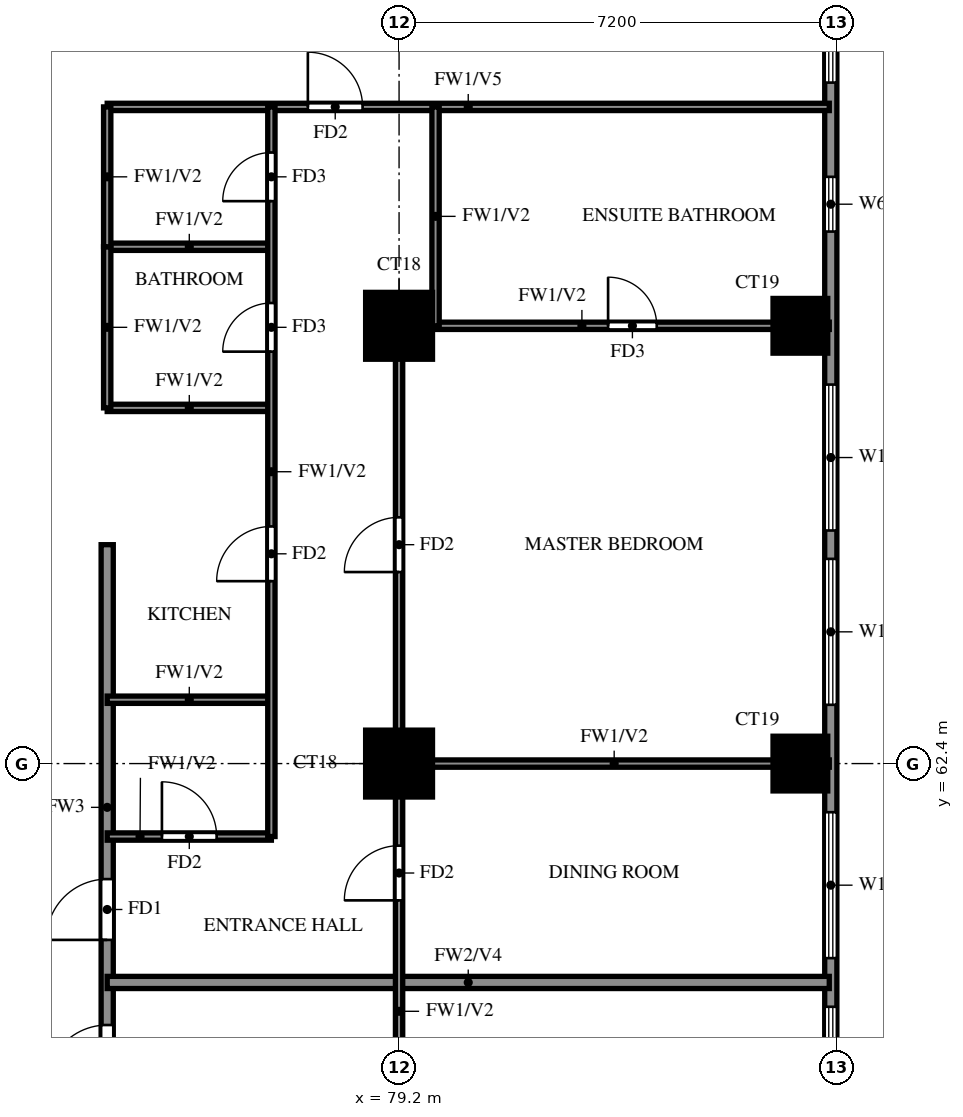
"""IFC4 building model, lengths in metres.
Left out: names, types, materials, properties, quantities, classifications, styles, units other than length and angle.
Written with IfcOpenShell. Run it as: python <this file> out.ifc"""

import sys

from ifc_helpers import new_model, si_unit, direction, frame, frame_2d, origin, origin_2d, place, context, subcontext, project, spatial, rectangle, extrude, source, transform, mapped, element, fill, save


model = new_model("IFC4")
c1 = context("Model", 3, precision=1e-05, world=origin(), true_north=direction((0.0, 1.0)))
c2 = subcontext(c1, "Body", "Model", "MODEL_VIEW")
j1 = project(units=[si_unit("LENGTHUNIT", "METRE"), si_unit("PLANEANGLEUNIT", "RADIAN")], contexts=[c1])
p1 = place(None, origin())
s1 = spatial("IfcSite", under=j1, at=p1, CompositionType="ELEMENT")
p2 = place(p1, origin())
s2 = spatial("IfcBuilding", under=s1, at=p2, CompositionType="ELEMENT")
p3 = place(p2, frame((0.0, 0.0, 116.5)))
s3 = spatial("IfcBuildingStorey", under=s2, at=p3, CompositionType="ELEMENT", Elevation=116.5)
m1 = source(origin(), c2, "Body", "SweptSolid", [
    extrude(rectangle(XDim=1.1, YDim=1.1, at=origin_2d()), origin(), (0.0, 0.0, 1.0), 3.2),
])
p4 = place(p3, frame((79.2, 62.4, 0.0), z_axis=(0.0, 0.0, 1.0), x_axis=(1.0, 0.0, 0.0)))
e1 = element("IfcColumn", 1, at=p4, inside=s3, PredefinedType="COLUMN", context=c2, shape_type="MappedRepresentation", body=[
    mapped(m1, transform((0.0, 0.0, 0.0))),
])
m2 = source(origin(), c2, "Body", "SweptSolid", [
    extrude(rectangle(XDim=0.9, YDim=0.9, at=origin_2d()), origin(), (0.0, 0.0, 1.0), 3.2),
])
p5 = place(p3, frame((85.8, 62.4, 0.0), z_axis=(0.0, 0.0, 1.0), x_axis=(1.0, 0.0, 0.0)))
e2 = element("IfcColumn", 2, at=p5, inside=s3, PredefinedType="COLUMN", context=c2, shape_type="MappedRepresentation", body=[
    mapped(m2, transform((0.0, 0.0, 0.0))),
])
p6 = place(p3, frame((79.2, 69.6, 0.0), z_axis=(0.0, 0.0, 1.0), x_axis=(1.0, 0.0, 0.0)))
e3 = element("IfcColumn", 3, at=p6, inside=s3, PredefinedType="COLUMN", context=c2, shape_type="MappedRepresentation", body=[
    mapped(m1, transform((0.0, 0.0, 0.0))),
])
p7 = place(p3, frame((85.8, 69.6, 0.0), z_axis=(0.0, 0.0, 1.0), x_axis=(1.0, 0.0, 0.0)))
e4 = element("IfcColumn", 4, at=p7, inside=s3, PredefinedType="COLUMN", context=c2, shape_type="MappedRepresentation", body=[
    mapped(m2, transform((0.0, 0.0, 0.0))),
])
p8 = place(p3, frame((86.3, 48.2, 0.0), z_axis=(0.0, 0.0, 1.0), x_axis=(0.0, 1.0, 0.0)))
e5 = element("IfcWall", 5, at=p8, inside=s3, PredefinedType="SOLIDWALL", context=c2, shape_type="SweptSolid", body=[
    extrude(rectangle(XDim=28.6, YDim=0.2, at=frame_2d((14.3, 0.0))), origin(), (0.0, 0.0, 1.0), 3.2),
])
p9 = place(p8, frame((0.6, 0.0, 0.6)))
e6 = element("IfcOpeningElement", 6, at=p9, cuts=e5, PredefinedType="OPENING", context=c2, shape_type="SweptSolid", body=[
    extrude(rectangle(XDim=2.4, YDim=2.4, at=frame_2d((1.2, 1.2))), frame((0.0, 0.11, 0.0), z_axis=(0.0, -1.0, 0.0), x_axis=(1.0, 0.0, 0.0)), (0.0, 0.0, 1.0), 0.22),
])
p10 = place(p8, frame((3.8, 0.0, 0.6)))
e7 = element("IfcOpeningElement", 7, at=p10, cuts=e5, PredefinedType="OPENING", context=c2, shape_type="SweptSolid", body=[
    extrude(rectangle(XDim=2.4, YDim=2.4, at=frame_2d((1.2, 1.2))), frame((0.0, 0.11, 0.0), z_axis=(0.0, -1.0, 0.0), x_axis=(1.0, 0.0, 0.0)), (0.0, 0.0, 1.0), 0.22),
])
p11 = place(p8, frame((7.8, 0.0, 0.6)))
e8 = element("IfcOpeningElement", 8, at=p11, cuts=e5, PredefinedType="OPENING", context=c2, shape_type="SweptSolid", body=[
    extrude(rectangle(XDim=2.4, YDim=2.4, at=frame_2d((1.2, 1.2))), frame((0.0, 0.11, 0.0), z_axis=(0.0, -1.0, 0.0), x_axis=(1.0, 0.0, 0.0)), (0.0, 0.0, 1.0), 0.22),
])
p12 = place(p8, frame((11.0, 0.0, 0.6)))
e9 = element("IfcOpeningElement", 9, at=p12, cuts=e5, PredefinedType="OPENING", context=c2, shape_type="SweptSolid", body=[
    extrude(rectangle(XDim=2.4, YDim=2.4, at=frame_2d((1.2, 1.2))), frame((0.0, 0.11, 0.0), z_axis=(0.0, -1.0, 0.0), x_axis=(1.0, 0.0, 0.0)), (0.0, 0.0, 1.0), 0.22),
])
p13 = place(p8, frame((15.167, 0.0, 0.6)))
e10 = element("IfcOpeningElement", 10, at=p13, cuts=e5, PredefinedType="OPENING", context=c2, shape_type="SweptSolid", body=[
    extrude(rectangle(XDim=2.4, YDim=2.4, at=frame_2d((1.2, 1.2))), frame((0.0, 0.11, 0.0), z_axis=(0.0, -1.0, 0.0), x_axis=(1.0, 0.0, 0.0)), (0.0, 0.0, 1.0), 0.22),
])
p14 = place(p8, frame((18.033, 0.0, 0.6)))
e11 = element("IfcOpeningElement", 11, at=p14, cuts=e5, PredefinedType="OPENING", context=c2, shape_type="SweptSolid", body=[
    extrude(rectangle(XDim=2.4, YDim=2.4, at=frame_2d((1.2, 1.2))), frame((0.0, 0.11, 0.0), z_axis=(0.0, -1.0, 0.0), x_axis=(1.0, 0.0, 0.0)), (0.0, 0.0, 1.0), 0.22),
])
p15 = place(p8, frame((22.95, 0.0, 1.5)))
e12 = element("IfcOpeningElement", 12, at=p15, cuts=e5, PredefinedType="OPENING", context=c2, shape_type="SweptSolid", body=[
    extrude(rectangle(XDim=0.9, YDim=0.9, at=frame_2d((0.45, 0.45))), frame((0.0, 0.11, 0.0), z_axis=(0.0, -1.0, 0.0), x_axis=(1.0, 0.0, 0.0)), (0.0, 0.0, 1.0), 0.22),
])
p16 = place(p8, frame((25.4, 0.0, 0.6)))
e13 = element("IfcOpeningElement", 13, at=p16, cuts=e5, PredefinedType="OPENING", context=c2, shape_type="SweptSolid", body=[
    extrude(rectangle(XDim=2.4, YDim=2.4, at=frame_2d((1.2, 1.2))), frame((0.0, 0.11, 0.0), z_axis=(0.0, -1.0, 0.0), x_axis=(1.0, 0.0, 0.0)), (0.0, 0.0, 1.0), 0.22),
])
p17 = place(p3, frame((74.4, 56.4, 0.0), z_axis=(0.0, 0.0, 1.0), x_axis=(0.0, 1.0, 0.0)))
e14 = element("IfcWall", 14, at=p17, inside=s3, PredefinedType="SOLIDWALL", context=c2, shape_type="SweptSolid", body=[
    extrude(rectangle(XDim=9.6, YDim=0.2, at=frame_2d((4.8, 0.0))), origin(), (0.0, 0.0, 1.0), 3.2),
])
p18 = place(p17, frame((0.7, 0.0, 0.0)))
e15 = element("IfcOpeningElement", 15, at=p18, cuts=e14, PredefinedType="OPENING", context=c2, shape_type="SweptSolid", body=[
    extrude(rectangle(XDim=1.0, YDim=2.1, at=frame_2d((0.5, 1.05))), frame((0.0, 0.11, 0.0), z_axis=(0.0, -1.0, 0.0), x_axis=(1.0, 0.0, 0.0)), (0.0, 0.0, 1.0), 0.22),
])
p19 = place(p17, frame((3.1, 0.0, 0.0)))
e16 = element("IfcOpeningElement", 16, at=p19, cuts=e14, PredefinedType="OPENING", context=c2, shape_type="SweptSolid", body=[
    extrude(rectangle(XDim=1.0, YDim=2.1, at=frame_2d((0.5, 1.05))), frame((0.0, 0.11, 0.0), z_axis=(0.0, -1.0, 0.0), x_axis=(1.0, 0.0, 0.0)), (0.0, 0.0, 1.0), 0.22),
])
p20 = place(p3, frame((74.4, 58.8, 0.0), z_axis=(0.0, 0.0, 1.0), x_axis=(1.0, 0.0, 0.0)))
e17 = element("IfcWall", 17, at=p20, inside=s3, PredefinedType="SOLIDWALL", context=c2, shape_type="SweptSolid", body=[
    extrude(rectangle(XDim=11.875, YDim=0.2, at=frame_2d((5.938, 0.0))), origin(), (0.0, 0.0, 1.0), 2.3),
])
p21 = place(p3, frame((74.4, 61.2, 0.0), z_axis=(0.0, 0.0, 1.0), x_axis=(1.0, 0.0, 0.0)))
e18 = element("IfcWall", 18, at=p21, inside=s3, PredefinedType="PARTITIONING", context=c2, shape_type="SweptSolid", body=[
    extrude(rectangle(XDim=2.7, YDim=0.12, at=frame_2d((1.35, 0.0))), origin(), (0.0, 0.0, 1.0), 3.2),
])
p22 = place(p21, frame((0.9, 0.0, 0.0)))
e19 = element("IfcOpeningElement", 19, at=p22, cuts=e18, PredefinedType="OPENING", context=c2, shape_type="SweptSolid", body=[
    extrude(rectangle(XDim=0.9, YDim=2.1, at=frame_2d((0.45, 1.05))), frame((0.0, 0.07, 0.0), z_axis=(0.0, -1.0, 0.0), x_axis=(1.0, 0.0, 0.0)), (0.0, 0.0, 1.0), 0.14),
])
p23 = place(p3, frame((79.2, 62.4, 0.0), z_axis=(0.0, 0.0, 1.0), x_axis=(1.0, 0.0, 0.0)))
e20 = element("IfcWall", 20, at=p23, inside=s3, PredefinedType="PARTITIONING", context=c2, shape_type="SweptSolid", body=[
    extrude(rectangle(XDim=7.075, YDim=0.12, at=frame_2d((3.538, 0.0))), origin(), (0.0, 0.0, 1.0), 3.2),
])
for number, where, z_axis, x_axis in (
    (21, (74.4, 63.45, 0.0), (0.0, 0.0, 1.0), (1.0, 0.0, 0.0)),
    (22, (74.4, 68.25, 0.0), (0.0, 0.0, 1.0), (1.0, 0.0, 0.0)),
):
    element("IfcWall", number, at=place(p3, frame(where, z_axis=z_axis, x_axis=x_axis)), inside=s3, PredefinedType="PARTITIONING", context=c2, shape_type="SweptSolid", body=[
        extrude(rectangle(XDim=2.7, YDim=0.12, at=frame_2d((1.35, 0.0))), origin(), (0.0, 0.0, 1.0), 3.2),
    ])
p24 = place(p3, frame((79.2, 69.6, 0.0), z_axis=(0.0, 0.0, 1.0), x_axis=(1.0, 0.0, 0.0)))
e23 = element("IfcWall", 23, at=p24, inside=s3, PredefinedType="PARTITIONING", context=c2, shape_type="SweptSolid", body=[
    extrude(rectangle(XDim=7.075, YDim=0.12, at=frame_2d((3.538, 0.0))), origin(), (0.0, 0.0, 1.0), 3.2),
])
p25 = place(p24, frame((3.438, 0.0, 0.0)))
e24 = element("IfcOpeningElement", 24, at=p25, cuts=e23, PredefinedType="OPENING", context=c2, shape_type="SweptSolid", body=[
    extrude(rectangle(XDim=0.8, YDim=2.1, at=frame_2d((0.4, 1.05))), frame((0.0, 0.07, 0.0), z_axis=(0.0, -1.0, 0.0), x_axis=(1.0, 0.0, 0.0)), (0.0, 0.0, 1.0), 0.14),
])
p26 = place(p3, frame((74.4, 70.9, 0.0), z_axis=(0.0, 0.0, 1.0), x_axis=(1.0, 0.0, 0.0)))
e25 = element("IfcWall", 25, at=p26, inside=s3, PredefinedType="PARTITIONING", context=c2, shape_type="SweptSolid", body=[
    extrude(rectangle(XDim=2.7, YDim=0.12, at=frame_2d((1.35, 0.0))), origin(), (0.0, 0.0, 1.0), 3.2),
])
p27 = place(p3, frame((74.4, 73.2, 0.0), z_axis=(0.0, 0.0, 1.0), x_axis=(1.0, 0.0, 0.0)))
e26 = element("IfcWall", 26, at=p27, inside=s3, PredefinedType="PARTITIONING", context=c2, shape_type="SweptSolid", body=[
    extrude(rectangle(XDim=11.875, YDim=0.12, at=frame_2d((5.938, 0.0))), origin(), (0.0, 0.0, 1.0), 2.3),
])
p28 = place(p27, frame((3.3, 0.0, 0.0)))
e27 = element("IfcOpeningElement", 27, at=p28, cuts=e26, PredefinedType="OPENING", context=c2, shape_type="SweptSolid", body=[
    extrude(rectangle(XDim=0.9, YDim=2.1, at=frame_2d((0.45, 1.05))), frame((0.0, 0.07, 0.0), z_axis=(0.0, -1.0, 0.0), x_axis=(1.0, 0.0, 0.0)), (0.0, 0.0, 1.0), 0.14),
])
p29 = place(p3, frame((74.4, 68.25, 0.0), z_axis=(0.0, 0.0, 1.0), x_axis=(0.0, 1.0, 0.0)))
e28 = element("IfcWall", 28, at=p29, inside=s3, PredefinedType="PARTITIONING", context=c2, shape_type="SweptSolid", body=[
    extrude(rectangle(XDim=2.65, YDim=0.12, at=frame_2d((1.325, 0.0))), origin(), (0.0, 0.0, 1.0), 3.2),
])
p30 = place(p3, frame((74.4, 70.9, 0.0), z_axis=(0.0, 0.0, 1.0), x_axis=(0.0, 1.0, 0.0)))
e29 = element("IfcWall", 29, at=p30, inside=s3, PredefinedType="PARTITIONING", context=c2, shape_type="SweptSolid", body=[
    extrude(rectangle(XDim=2.3, YDim=0.12, at=frame_2d((1.15, 0.0))), origin(), (0.0, 0.0, 1.0), 3.2),
])
p31 = place(p3, frame((77.1, 61.2, 0.0), z_axis=(0.0, 0.0, 1.0), x_axis=(0.0, 1.0, 0.0)))
e30 = element("IfcWall", 30, at=p31, inside=s3, PredefinedType="PARTITIONING", context=c2, shape_type="SweptSolid", body=[
    extrude(rectangle(XDim=12.0, YDim=0.12, at=frame_2d((6.0, 0.0))), origin(), (0.0, 0.0, 1.0), 3.2),
])
p32 = place(p31, frame((4.2, 0.0, 0.0)))
e31 = element("IfcOpeningElement", 31, at=p32, cuts=e30, PredefinedType="OPENING", context=c2, shape_type="SweptSolid", body=[
    extrude(rectangle(XDim=0.9, YDim=2.1, at=frame_2d((0.45, 1.05))), frame((0.0, 0.07, 0.0), z_axis=(0.0, -1.0, 0.0), x_axis=(1.0, 0.0, 0.0)), (0.0, 0.0, 1.0), 0.14),
])
p33 = place(p31, frame((7.975, 0.0, 0.0)))
e32 = element("IfcOpeningElement", 32, at=p33, cuts=e30, PredefinedType="OPENING", context=c2, shape_type="SweptSolid", body=[
    extrude(rectangle(XDim=0.8, YDim=2.1, at=frame_2d((0.4, 1.05))), frame((0.0, 0.07, 0.0), z_axis=(0.0, -1.0, 0.0), x_axis=(1.0, 0.0, 0.0)), (0.0, 0.0, 1.0), 0.14),
])
p34 = place(p31, frame((10.45, 0.0, 0.0)))
e33 = element("IfcOpeningElement", 33, at=p34, cuts=e30, PredefinedType="OPENING", context=c2, shape_type="SweptSolid", body=[
    extrude(rectangle(XDim=0.8, YDim=2.1, at=frame_2d((0.4, 1.05))), frame((0.0, 0.07, 0.0), z_axis=(0.0, -1.0, 0.0), x_axis=(1.0, 0.0, 0.0)), (0.0, 0.0, 1.0), 0.14),
])
p35 = place(p3, frame((79.2, 48.125, 0.0), z_axis=(0.0, 0.0, 1.0), x_axis=(0.0, 1.0, 0.0)))
e34 = element("IfcWall", 34, at=p35, inside=s3, PredefinedType="PARTITIONING", context=c2, shape_type="SweptSolid", body=[
    extrude(rectangle(XDim=21.475, YDim=0.12, at=frame_2d((10.738, 0.0))), origin(), (0.0, 0.0, 1.0), 3.2),
])
p36 = place(p35, frame((1.288, 0.0, 0.0)))
e35 = element("IfcOpeningElement", 35, at=p36, cuts=e34, PredefinedType="OPENING", context=c2, shape_type="SweptSolid", body=[
    extrude(rectangle(XDim=0.9, YDim=2.1, at=frame_2d((0.45, 1.05))), frame((0.0, 0.07, 0.0), z_axis=(0.0, -1.0, 0.0), x_axis=(1.0, 0.0, 0.0)), (0.0, 0.0, 1.0), 0.14),
])
p37 = place(p35, frame((7.825, 0.0, 0.0)))
e36 = element("IfcOpeningElement", 36, at=p37, cuts=e34, PredefinedType="OPENING", context=c2, shape_type="SweptSolid", body=[
    extrude(rectangle(XDim=1.5, YDim=2.1, at=frame_2d((0.75, 1.05))), frame((0.0, 0.07, 0.0), z_axis=(0.0, -1.0, 0.0), x_axis=(1.0, 0.0, 0.0)), (0.0, 0.0, 1.0), 0.14),
])
p38 = place(p35, frame((12.025, 0.0, 0.0)))
e37 = element("IfcOpeningElement", 37, at=p38, cuts=e34, PredefinedType="OPENING", context=c2, shape_type="SweptSolid", body=[
    extrude(rectangle(XDim=0.9, YDim=2.1, at=frame_2d((0.45, 1.05))), frame((0.0, 0.07, 0.0), z_axis=(0.0, -1.0, 0.0), x_axis=(1.0, 0.0, 0.0)), (0.0, 0.0, 1.0), 0.14),
])
p39 = place(p35, frame((17.425, 0.0, 0.0)))
e38 = element("IfcOpeningElement", 38, at=p39, cuts=e34, PredefinedType="OPENING", context=c2, shape_type="SweptSolid", body=[
    extrude(rectangle(XDim=0.9, YDim=2.1, at=frame_2d((0.45, 1.05))), frame((0.0, 0.07, 0.0), z_axis=(0.0, -1.0, 0.0), x_axis=(1.0, 0.0, 0.0)), (0.0, 0.0, 1.0), 0.14),
])
p40 = place(p3, frame((79.8, 69.6, 0.0), z_axis=(0.0, 0.0, 1.0), x_axis=(0.0, 1.0, 0.0)))
e39 = element("IfcWall", 39, at=p40, inside=s3, PredefinedType="PARTITIONING", context=c2, shape_type="SweptSolid", body=[
    extrude(rectangle(XDim=3.6, YDim=0.12, at=frame_2d((1.8, 0.0))), origin(), (0.0, 0.0, 1.0), 3.2),
])
p41 = place(p11, origin())
e40 = element("IfcWindow", 40, at=p41, inside=s3, PartitioningType="DOUBLE_PANEL_VERTICAL", PredefinedType="WINDOW", context=c2, shape_type="SweptSolid", body=[
    extrude(rectangle(XDim=2.4, YDim=2.4, at=frame_2d((1.2, 1.2))), frame((0.0, 0.03, 0.0), z_axis=(0.0, -1.0, 0.0), x_axis=(1.0, 0.0, 0.0)), (0.0, 0.0, 1.0), 0.06),
])
fill(e8, e40)
p42 = place(p12, origin())
e41 = element("IfcWindow", 41, at=p42, inside=s3, PartitioningType="DOUBLE_PANEL_VERTICAL", PredefinedType="WINDOW", context=c2, shape_type="SweptSolid", body=[
    extrude(rectangle(XDim=2.4, YDim=2.4, at=frame_2d((1.2, 1.2))), frame((0.0, 0.03, 0.0), z_axis=(0.0, -1.0, 0.0), x_axis=(1.0, 0.0, 0.0)), (0.0, 0.0, 1.0), 0.06),
])
fill(e9, e41)
p43 = place(p13, origin())
e42 = element("IfcWindow", 42, at=p43, inside=s3, PartitioningType="DOUBLE_PANEL_VERTICAL", PredefinedType="WINDOW", context=c2, shape_type="SweptSolid", body=[
    extrude(rectangle(XDim=2.4, YDim=2.4, at=frame_2d((1.2, 1.2))), frame((0.0, 0.03, 0.0), z_axis=(0.0, -1.0, 0.0), x_axis=(1.0, 0.0, 0.0)), (0.0, 0.0, 1.0), 0.06),
])
fill(e10, e42)
p44 = place(p14, origin())
e43 = element("IfcWindow", 43, at=p44, inside=s3, PartitioningType="DOUBLE_PANEL_VERTICAL", PredefinedType="WINDOW", context=c2, shape_type="SweptSolid", body=[
    extrude(rectangle(XDim=2.4, YDim=2.4, at=frame_2d((1.2, 1.2))), frame((0.0, 0.03, 0.0), z_axis=(0.0, -1.0, 0.0), x_axis=(1.0, 0.0, 0.0)), (0.0, 0.0, 1.0), 0.06),
])
fill(e11, e43)
p45 = place(p15, origin())
e44 = element("IfcWindow", 44, at=p45, inside=s3, PartitioningType="SINGLE_PANEL", PredefinedType="WINDOW", context=c2, shape_type="SweptSolid", body=[
    extrude(rectangle(XDim=0.9, YDim=0.9, at=frame_2d((0.45, 0.45))), frame((0.0, 0.03, 0.0), z_axis=(0.0, -1.0, 0.0), x_axis=(1.0, 0.0, 0.0)), (0.0, 0.0, 1.0), 0.06),
])
fill(e12, e44)
p46 = place(p16, origin())
e45 = element("IfcWindow", 45, at=p46, inside=s3, PartitioningType="DOUBLE_PANEL_VERTICAL", PredefinedType="WINDOW", context=c2, shape_type="SweptSolid", body=[
    extrude(rectangle(XDim=2.4, YDim=2.4, at=frame_2d((1.2, 1.2))), frame((0.0, 0.03, 0.0), z_axis=(0.0, -1.0, 0.0), x_axis=(1.0, 0.0, 0.0)), (0.0, 0.0, 1.0), 0.06),
])
fill(e13, e45)
p47 = place(p18, origin())
e46 = element("IfcDoor", 46, at=p47, inside=s3, OperationType="SINGLE_SWING_RIGHT", PredefinedType="DOOR", context=c2, shape_type="SweptSolid", body=[
    extrude(rectangle(XDim=1.0, YDim=2.1, at=frame_2d((0.5, 1.05))), frame((0.0, 0.025, 0.0), z_axis=(0.0, -1.0, 0.0), x_axis=(1.0, 0.0, 0.0)), (0.0, 0.0, 1.0), 0.05),
])
fill(e15, e46)
p48 = place(p19, origin())
e47 = element("IfcDoor", 47, at=p48, inside=s3, OperationType="SINGLE_SWING_LEFT", PredefinedType="DOOR", context=c2, shape_type="SweptSolid", body=[
    extrude(rectangle(XDim=1.0, YDim=2.1, at=frame_2d((0.5, 1.05))), frame((0.0, 0.025, 0.0), z_axis=(0.0, -1.0, 0.0), x_axis=(1.0, 0.0, 0.0)), (0.0, 0.0, 1.0), 0.05),
])
fill(e16, e47)
p49 = place(p38, origin())
e48 = element("IfcDoor", 48, at=p49, inside=s3, OperationType="SINGLE_SWING_LEFT", PredefinedType="DOOR", context=c2, shape_type="SweptSolid", body=[
    extrude(rectangle(XDim=0.9, YDim=2.1, at=frame_2d((0.45, 1.05))), frame((0.0, 0.025, 0.0), z_axis=(0.0, -1.0, 0.0), x_axis=(1.0, 0.0, 0.0)), (0.0, 0.0, 1.0), 0.05),
])
fill(e37, e48)
p50 = place(p39, origin())
e49 = element("IfcDoor", 49, at=p50, inside=s3, OperationType="SINGLE_SWING_RIGHT", PredefinedType="DOOR", context=c2, shape_type="SweptSolid", body=[
    extrude(rectangle(XDim=0.9, YDim=2.1, at=frame_2d((0.45, 1.05))), frame((0.0, 0.025, 0.0), z_axis=(0.0, -1.0, 0.0), x_axis=(1.0, 0.0, 0.0)), (0.0, 0.0, 1.0), 0.05),
])
fill(e38, e49)
p51 = place(p25, origin())
e50 = element("IfcDoor", 50, at=p51, inside=s3, OperationType="SINGLE_SWING_LEFT", PredefinedType="DOOR", context=c2, shape_type="SweptSolid", body=[
    extrude(rectangle(XDim=0.8, YDim=2.1, at=frame_2d((0.4, 1.05))), frame((0.0, 0.025, 0.0), z_axis=(0.0, -1.0, 0.0), x_axis=(1.0, 0.0, 0.0)), (0.0, 0.0, 1.0), 0.05),
])
fill(e24, e50)
p52 = place(p28, origin())
e51 = element("IfcDoor", 51, at=p52, inside=s3, OperationType="SINGLE_SWING_LEFT", PredefinedType="DOOR", context=c2, shape_type="SweptSolid", body=[
    extrude(rectangle(XDim=0.9, YDim=2.1, at=frame_2d((0.45, 1.05))), frame((0.0, 0.025, 0.0), z_axis=(0.0, -1.0, 0.0), x_axis=(1.0, 0.0, 0.0)), (0.0, 0.0, 1.0), 0.05),
])
fill(e27, e51)
p53 = place(p22, origin())
e52 = element("IfcDoor", 52, at=p53, inside=s3, OperationType="SINGLE_SWING_RIGHT", PredefinedType="DOOR", context=c2, shape_type="SweptSolid", body=[
    extrude(rectangle(XDim=0.9, YDim=2.1, at=frame_2d((0.45, 1.05))), frame((0.0, 0.025, 0.0), z_axis=(0.0, -1.0, 0.0), x_axis=(1.0, 0.0, 0.0)), (0.0, 0.0, 1.0), 0.05),
])
fill(e19, e52)
p54 = place(p32, origin())
e53 = element("IfcDoor", 53, at=p54, inside=s3, OperationType="SINGLE_SWING_LEFT", PredefinedType="DOOR", context=c2, shape_type="SweptSolid", body=[
    extrude(rectangle(XDim=0.9, YDim=2.1, at=frame_2d((0.45, 1.05))), frame((0.0, 0.025, 0.0), z_axis=(0.0, -1.0, 0.0), x_axis=(1.0, 0.0, 0.0)), (0.0, 0.0, 1.0), 0.05),
])
fill(e31, e53)
p55 = place(p33, origin())
e54 = element("IfcDoor", 54, at=p55, inside=s3, OperationType="SINGLE_SWING_LEFT", PredefinedType="DOOR", context=c2, shape_type="SweptSolid", body=[
    extrude(rectangle(XDim=0.8, YDim=2.1, at=frame_2d((0.4, 1.05))), frame((0.0, 0.025, 0.0), z_axis=(0.0, -1.0, 0.0), x_axis=(1.0, 0.0, 0.0)), (0.0, 0.0, 1.0), 0.05),
])
fill(e32, e54)
p56 = place(p34, origin())
e55 = element("IfcDoor", 55, at=p56, inside=s3, OperationType="SINGLE_SWING_RIGHT", PredefinedType="DOOR", context=c2, shape_type="SweptSolid", body=[
    extrude(rectangle(XDim=0.8, YDim=2.1, at=frame_2d((0.4, 1.05))), frame((0.0, 0.025, 0.0), z_axis=(0.0, -1.0, 0.0), x_axis=(1.0, 0.0, 0.0)), (0.0, 0.0, 1.0), 0.05),
])
fill(e33, e55)
save(model, sys.argv[1])
